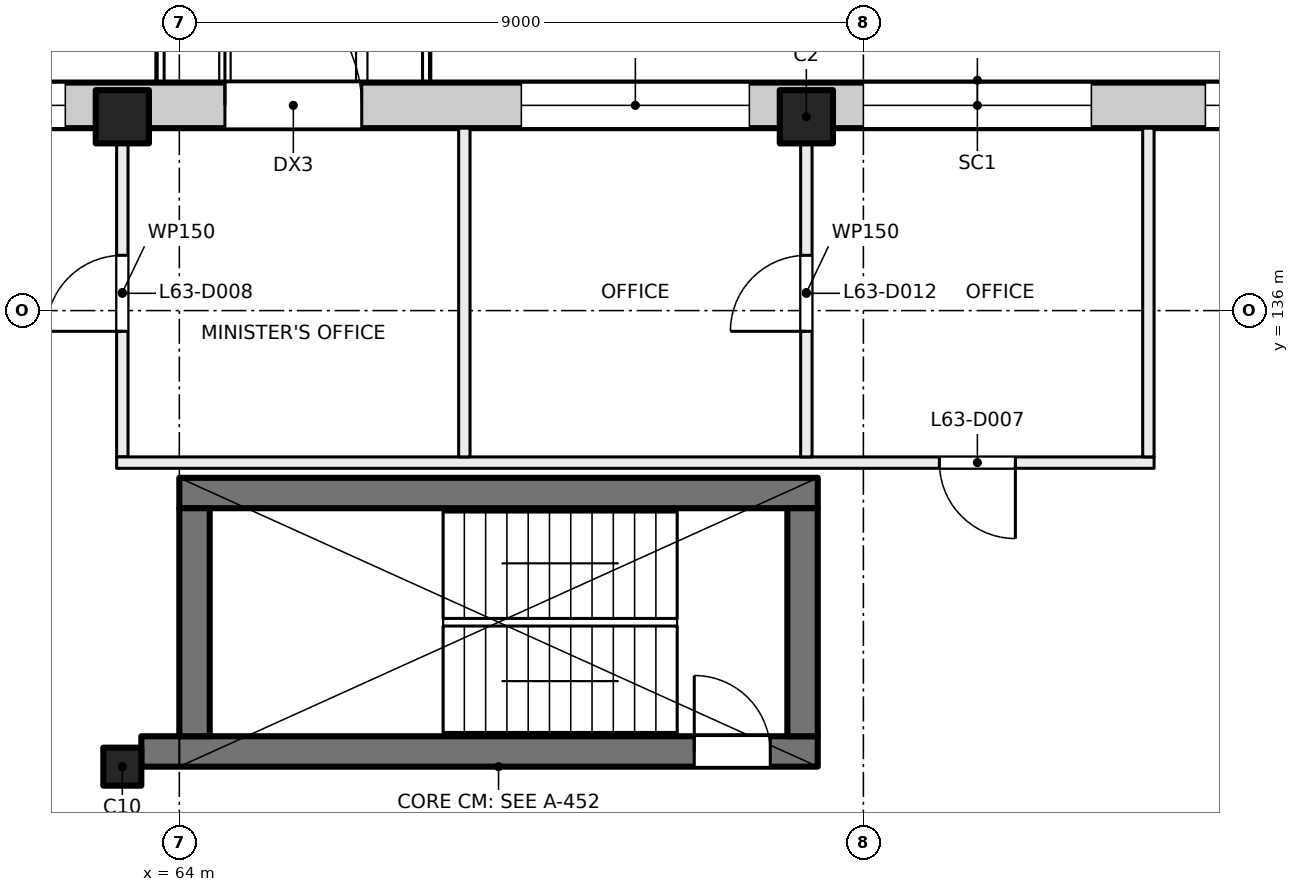
"""IFC4 building model, lengths in metres.
Left out: names, types, materials, properties, quantities, classifications, styles, units other than length and angle.
Written with IfcOpenShell. Run it as: python <this file> out.ifc"""

import sys

from ifc_helpers import new_model, si_unit, direction, frame, frame_2d, origin, origin_2d, place, context, subcontext, project, spatial, rectangle, extrude, element, fill, save


model = new_model("IFC4")
c1 = context("Model", 3, precision=1e-05, world=origin(), true_north=direction((0.0, 1.0)))
c2 = subcontext(c1, "Body", "Model", "MODEL_VIEW")
j1 = project(units=[si_unit("LENGTHUNIT", "METRE"), si_unit("PLANEANGLEUNIT", "RADIAN")], contexts=[c1])
p1 = place(None, origin())
s1 = spatial("IfcSite", under=j1, at=p1, CompositionType="ELEMENT")
p2 = place(p1, origin())
s2 = spatial("IfcBuilding", under=s1, at=p2, CompositionType="ELEMENT")
p3 = place(p2, frame((0.0, 0.0, 265.5)))
s3 = spatial("IfcBuildingStorey", under=s2, at=p3, CompositionType="ELEMENT", Elevation=265.5)
p4 = place(p3, frame((63.25, 130.0, 0.0), z_axis=(0.0, 0.0, 1.0), x_axis=(1.0, 0.0, 0.0)))
e1 = element("IfcColumn", 1, at=p4, inside=s3, PredefinedType="COLUMN", context=c2, shape_type="SweptSolid", body=[
    extrude(rectangle(XDim=0.5, YDim=0.5, at=origin_2d()), origin(), (0.0, 0.0, 1.0), 4.0),
])
for number, where, z_axis, x_axis in (
    (2, (63.25, 138.55, 0.0), (0.0, 0.0, 1.0), (1.0, 0.0, 0.0)),
    (3, (72.25, 138.55, 0.0), (0.0, 0.0, 1.0), (1.0, 0.0, 0.0)),
):
    element("IfcColumn", number, at=place(p3, frame(where, z_axis=z_axis, x_axis=x_axis)), inside=s3, PredefinedType="COLUMN", context=c2, shape_type="SweptSolid", body=[
        extrude(rectangle(XDim=0.7, YDim=0.7, at=origin_2d()), origin(), (0.0, 0.0, 1.0), 4.0),
    ])
p5 = place(p3, frame((63.5, 130.2, 0.0), z_axis=(0.0, 0.0, 1.0), x_axis=(1.0, 0.0, 0.0)))
e4 = element("IfcWall", 4, at=p5, inside=s3, PredefinedType="SHEAR", context=c2, shape_type="SweptSolid", body=[
    extrude(rectangle(XDim=8.9, YDim=0.4, at=frame_2d((4.45, 0.0))), origin(), (0.0, 0.0, 1.0), 4.0),
])
p6 = place(p5, frame((7.275, 0.0, 0.0)))
e5 = element("IfcOpeningElement", 5, at=p6, cuts=e4, PredefinedType="OPENING", context=c2, shape_type="SweptSolid", body=[
    extrude(rectangle(XDim=1.0, YDim=2.1, at=frame_2d((0.5, 1.05))), frame((0.0, 0.21, 0.0), z_axis=(0.0, -1.0, 0.0), x_axis=(1.0, 0.0, 0.0)), (0.0, 0.0, 1.0), 0.42),
])
p7 = place(p3, frame((64.0, 133.6, 0.0), z_axis=(0.0, 0.0, 1.0), x_axis=(1.0, 0.0, 0.0)))
e6 = element("IfcWall", 6, at=p7, inside=s3, PredefinedType="SHEAR", context=c2, shape_type="SweptSolid", body=[
    extrude(rectangle(XDim=8.4, YDim=0.4, at=frame_2d((4.2, 0.0))), origin(), (0.0, 0.0, 1.0), 4.0),
])
for number, where, z_axis, x_axis in (
    (7, (64.2, 130.4, 0.0), (0.0, 0.0, 1.0), (0.0, 1.0, 0.0)),
    (8, (72.2, 130.4, 0.0), (0.0, 0.0, 1.0), (0.0, 1.0, 0.0)),
):
    element("IfcWall", number, at=place(p3, frame(where, z_axis=z_axis, x_axis=x_axis)), inside=s3, PredefinedType="SHEAR", context=c2, shape_type="SweptSolid", body=[
        extrude(rectangle(XDim=3.0, YDim=0.4, at=frame_2d((1.5, 0.0))), origin(), (0.0, 0.0, 1.0), 4.0),
    ])
p8 = place(p3, frame((47.07, 138.7, 0.0), z_axis=(0.0, 0.0, 1.0), x_axis=(1.0, 0.0, 0.0)))
e9 = element("IfcWall", 9, at=p8, inside=s3, PredefinedType="SOLIDWALL", context=c2, shape_type="SweptSolid", body=[
    extrude(rectangle(XDim=43.91, YDim=0.6, at=frame_2d((21.955, 0.0))), origin(), (0.0, 0.0, 1.0), 3.625),
])
p9 = place(p8, frame((4.03, 0.0, 0.0)))
e10 = element("IfcOpeningElement", 10, at=p9, cuts=e9, PredefinedType="OPENING", context=c2, shape_type="SweptSolid", body=[
    extrude(rectangle(XDim=1.8, YDim=2.4, at=frame_2d((0.9, 1.2))), frame((0.0, 0.31, 0.0), z_axis=(0.0, -1.0, 0.0), x_axis=(1.0, 0.0, 0.0)), (0.0, 0.0, 1.0), 0.62),
])
p10 = place(p8, frame((7.93, 0.0, 0.9)))
e11 = element("IfcOpeningElement", 11, at=p10, cuts=e9, PredefinedType="OPENING", context=c2, shape_type="SweptSolid", body=[
    extrude(rectangle(XDim=3.0, YDim=2.4, at=frame_2d((1.5, 1.2))), frame((0.0, 0.31, 0.0), z_axis=(0.0, -1.0, 0.0), x_axis=(1.0, 0.0, 0.0)), (0.0, 0.0, 1.0), 0.62),
])
p11 = place(p8, frame((12.43, 0.0, 0.9)))
e12 = element("IfcOpeningElement", 12, at=p11, cuts=e9, PredefinedType="OPENING", context=c2, shape_type="SweptSolid", body=[
    extrude(rectangle(XDim=3.0, YDim=2.4, at=frame_2d((1.5, 1.2))), frame((0.0, 0.31, 0.0), z_axis=(0.0, -1.0, 0.0), x_axis=(1.0, 0.0, 0.0)), (0.0, 0.0, 1.0), 0.62),
])
p12 = place(p8, frame((17.53, 0.0, 0.0)))
e13 = element("IfcOpeningElement", 13, at=p12, cuts=e9, PredefinedType="OPENING", context=c2, shape_type="SweptSolid", body=[
    extrude(rectangle(XDim=1.8, YDim=2.4, at=frame_2d((0.9, 1.2))), frame((0.0, 0.31, 0.0), z_axis=(0.0, -1.0, 0.0), x_axis=(1.0, 0.0, 0.0)), (0.0, 0.0, 1.0), 0.62),
])
p13 = place(p8, frame((21.43, 0.0, 0.9)))
e14 = element("IfcOpeningElement", 14, at=p13, cuts=e9, PredefinedType="OPENING", context=c2, shape_type="SweptSolid", body=[
    extrude(rectangle(XDim=3.0, YDim=2.4, at=frame_2d((1.5, 1.2))), frame((0.0, 0.31, 0.0), z_axis=(0.0, -1.0, 0.0), x_axis=(1.0, 0.0, 0.0)), (0.0, 0.0, 1.0), 0.62),
])
p14 = place(p8, frame((25.93, 0.0, 0.9)))
e15 = element("IfcOpeningElement", 15, at=p14, cuts=e9, PredefinedType="OPENING", context=c2, shape_type="SweptSolid", body=[
    extrude(rectangle(XDim=3.0, YDim=2.4, at=frame_2d((1.5, 1.2))), frame((0.0, 0.31, 0.0), z_axis=(0.0, -1.0, 0.0), x_axis=(1.0, 0.0, 0.0)), (0.0, 0.0, 1.0), 0.62),
])
p15 = place(p8, frame((30.43, 0.0, 0.9)))
e16 = element("IfcOpeningElement", 16, at=p15, cuts=e9, PredefinedType="OPENING", context=c2, shape_type="SweptSolid", body=[
    extrude(rectangle(XDim=3.0, YDim=2.4, at=frame_2d((1.5, 1.2))), frame((0.0, 0.31, 0.0), z_axis=(0.0, -1.0, 0.0), x_axis=(1.0, 0.0, 0.0)), (0.0, 0.0, 1.0), 0.62),
])
p16 = place(p8, frame((34.93, 0.0, 0.9)))
e17 = element("IfcOpeningElement", 17, at=p16, cuts=e9, PredefinedType="OPENING", context=c2, shape_type="SweptSolid", body=[
    extrude(rectangle(XDim=3.0, YDim=2.4, at=frame_2d((1.5, 1.2))), frame((0.0, 0.31, 0.0), z_axis=(0.0, -1.0, 0.0), x_axis=(1.0, 0.0, 0.0)), (0.0, 0.0, 1.0), 0.62),
])
p17 = place(p8, frame((39.43, 0.0, 0.9)))
e18 = element("IfcOpeningElement", 18, at=p17, cuts=e9, PredefinedType="OPENING", context=c2, shape_type="SweptSolid", body=[
    extrude(rectangle(XDim=3.0, YDim=2.4, at=frame_2d((1.5, 1.2))), frame((0.0, 0.31, 0.0), z_axis=(0.0, -1.0, 0.0), x_axis=(1.0, 0.0, 0.0)), (0.0, 0.0, 1.0), 0.62),
])
p18 = place(p3, frame((63.25, 134.075, 0.0), z_axis=(0.0, 0.0, 1.0), x_axis=(0.0, 1.0, 0.0)))
e19 = element("IfcWall", 19, at=p18, inside=s3, PredefinedType="PARTITIONING", context=c2, shape_type="SweptSolid", body=[
    extrude(rectangle(XDim=4.325, YDim=0.15, at=frame_2d((2.163, 0.0))), origin(), (0.0, 0.0, 1.0), 3.625),
])
p19 = place(p18, frame((1.653, 0.0, 0.0)))
e20 = element("IfcOpeningElement", 20, at=p19, cuts=e19, PredefinedType="OPENING", context=c2, shape_type="SweptSolid", body=[
    extrude(rectangle(XDim=1.0, YDim=2.1, at=frame_2d((0.5, 1.05))), frame((0.0, 0.085, 0.0), z_axis=(0.0, -1.0, 0.0), x_axis=(1.0, 0.0, 0.0)), (0.0, 0.0, 1.0), 0.17),
])
p20 = place(p3, frame((76.825, 134.0, 0.0), z_axis=(0.0, 0.0, 1.0), x_axis=(-1.0, 0.0, 0.0)))
e21 = element("IfcWall", 21, at=p20, inside=s3, PredefinedType="PARTITIONING", context=c2, shape_type="SweptSolid", body=[
    extrude(rectangle(XDim=13.65, YDim=0.15, at=frame_2d((6.825, 0.0))), origin(), (0.0, 0.0, 1.0), 3.625),
])
p21 = place(p20, frame((1.825, 0.0, 0.0)))
e22 = element("IfcOpeningElement", 22, at=p21, cuts=e21, PredefinedType="OPENING", context=c2, shape_type="SweptSolid", body=[
    extrude(rectangle(XDim=1.0, YDim=2.1, at=frame_2d((0.5, 1.05))), frame((0.0, 0.085, 0.0), z_axis=(0.0, -1.0, 0.0), x_axis=(1.0, 0.0, 0.0)), (0.0, 0.0, 1.0), 0.17),
])
p22 = place(p3, frame((67.75, 134.075, 0.0), z_axis=(0.0, 0.0, 1.0), x_axis=(0.0, 1.0, 0.0)))
e23 = element("IfcWall", 23, at=p22, inside=s3, PredefinedType="PARTITIONING", context=c2, shape_type="SweptSolid", body=[
    extrude(rectangle(XDim=4.325, YDim=0.15, at=frame_2d((2.163, 0.0))), origin(), (0.0, 0.0, 1.0), 3.625),
])
p23 = place(p3, frame((72.25, 134.075, 0.0), z_axis=(0.0, 0.0, 1.0), x_axis=(0.0, 1.0, 0.0)))
e24 = element("IfcWall", 24, at=p23, inside=s3, PredefinedType="PARTITIONING", context=c2, shape_type="SweptSolid", body=[
    extrude(rectangle(XDim=4.325, YDim=0.15, at=frame_2d((2.163, 0.0))), origin(), (0.0, 0.0, 1.0), 3.625),
])
p24 = place(p23, frame((1.653, 0.0, 0.0)))
e25 = element("IfcOpeningElement", 25, at=p24, cuts=e24, PredefinedType="OPENING", context=c2, shape_type="SweptSolid", body=[
    extrude(rectangle(XDim=1.0, YDim=2.1, at=frame_2d((0.5, 1.05))), frame((0.0, 0.085, 0.0), z_axis=(0.0, -1.0, 0.0), x_axis=(1.0, 0.0, 0.0)), (0.0, 0.0, 1.0), 0.17),
])
p25 = place(p3, frame((76.75, 138.4, 0.0), z_axis=(0.0, 0.0, 1.0), x_axis=(0.0, -1.0, 0.0)))
e26 = element("IfcWall", 26, at=p25, inside=s3, PredefinedType="PARTITIONING", context=c2, shape_type="SweptSolid", body=[
    extrude(rectangle(XDim=4.325, YDim=0.15, at=frame_2d((2.163, 0.0))), origin(), (0.0, 0.0, 1.0), 3.625),
])
p26 = place(p11, origin())
e27 = element("IfcWindow", 27, at=p26, inside=s3, PartitioningType="SINGLE_PANEL", PredefinedType="WINDOW", context=c2, shape_type="SweptSolid", body=[
    extrude(rectangle(XDim=3.0, YDim=2.4, at=frame_2d((1.5, 1.2))), frame((0.0, 0.03, 0.0), z_axis=(0.0, -1.0, 0.0), x_axis=(1.0, 0.0, 0.0)), (0.0, 0.0, 1.0), 0.06),
])
fill(e12, e27)
p27 = place(p12, origin())
e28 = element("IfcDoor", 28, at=p27, inside=s3, OperationType="DOUBLE_DOOR_SINGLE_SWING", PredefinedType="DOOR", context=c2, shape_type="SweptSolid", body=[
    extrude(rectangle(XDim=1.8, YDim=2.4, at=frame_2d((0.9, 1.2))), frame((0.0, 0.025, 0.0), z_axis=(0.0, -1.0, 0.0), x_axis=(1.0, 0.0, 0.0)), (0.0, 0.0, 1.0), 0.05),
])
fill(e13, e28)
p28 = place(p13, origin())
e29 = element("IfcWindow", 29, at=p28, inside=s3, PartitioningType="SINGLE_PANEL", PredefinedType="WINDOW", context=c2, shape_type="SweptSolid", body=[
    extrude(rectangle(XDim=3.0, YDim=2.4, at=frame_2d((1.5, 1.2))), frame((0.0, 0.03, 0.0), z_axis=(0.0, -1.0, 0.0), x_axis=(1.0, 0.0, 0.0)), (0.0, 0.0, 1.0), 0.06),
])
fill(e14, e29)
p29 = place(p14, origin())
e30 = element("IfcWindow", 30, at=p29, inside=s3, PartitioningType="SINGLE_PANEL", PredefinedType="WINDOW", context=c2, shape_type="SweptSolid", body=[
    extrude(rectangle(XDim=3.0, YDim=2.4, at=frame_2d((1.5, 1.2))), frame((0.0, 0.03, 0.0), z_axis=(0.0, -1.0, 0.0), x_axis=(1.0, 0.0, 0.0)), (0.0, 0.0, 1.0), 0.06),
])
fill(e15, e30)
p30 = place(p15, origin())
e31 = element("IfcWindow", 31, at=p30, inside=s3, PartitioningType="SINGLE_PANEL", PredefinedType="WINDOW", context=c2, shape_type="SweptSolid", body=[
    extrude(rectangle(XDim=3.0, YDim=2.4, at=frame_2d((1.5, 1.2))), frame((0.0, 0.03, 0.0), z_axis=(0.0, -1.0, 0.0), x_axis=(1.0, 0.0, 0.0)), (0.0, 0.0, 1.0), 0.06),
])
fill(e16, e31)
p31 = place(p6, origin())
e32 = element("IfcDoor", 32, at=p31, inside=s3, OperationType="SINGLE_SWING_LEFT", PredefinedType="DOOR", context=c2, shape_type="SweptSolid", body=[
    extrude(rectangle(XDim=1.0, YDim=2.1, at=frame_2d((0.5, 1.05))), frame((0.0, 0.025, 0.0), z_axis=(0.0, -1.0, 0.0), x_axis=(1.0, 0.0, 0.0)), (0.0, 0.0, 1.0), 0.05),
])
fill(e5, e32)
p32 = place(p21, origin())
e33 = element("IfcDoor", 33, at=p32, inside=s3, OperationType="SINGLE_SWING_LEFT", PredefinedType="DOOR", context=c2, shape_type="SweptSolid", body=[
    extrude(rectangle(XDim=1.0, YDim=2.1, at=frame_2d((0.5, 1.05))), frame((0.0, 0.025, 0.0), z_axis=(0.0, -1.0, 0.0), x_axis=(1.0, 0.0, 0.0)), (0.0, 0.0, 1.0), 0.05),
])
fill(e22, e33)
p33 = place(p19, origin())
e34 = element("IfcDoor", 34, at=p33, inside=s3, OperationType="SINGLE_SWING_LEFT", PredefinedType="DOOR", context=c2, shape_type="SweptSolid", body=[
    extrude(rectangle(XDim=1.0, YDim=2.1, at=frame_2d((0.5, 1.05))), frame((0.0, 0.025, 0.0), z_axis=(0.0, -1.0, 0.0), x_axis=(1.0, 0.0, 0.0)), (0.0, 0.0, 1.0), 0.05),
])
fill(e20, e34)
p34 = place(p24, origin())
e35 = element("IfcDoor", 35, at=p34, inside=s3, OperationType="SINGLE_SWING_LEFT", PredefinedType="DOOR", context=c2, shape_type="SweptSolid", body=[
    extrude(rectangle(XDim=1.0, YDim=2.1, at=frame_2d((0.5, 1.05))), frame((0.0, 0.025, 0.0), z_axis=(0.0, -1.0, 0.0), x_axis=(1.0, 0.0, 0.0)), (0.0, 0.0, 1.0), 0.05),
])
fill(e25, e35)
save(model, sys.argv[1])
